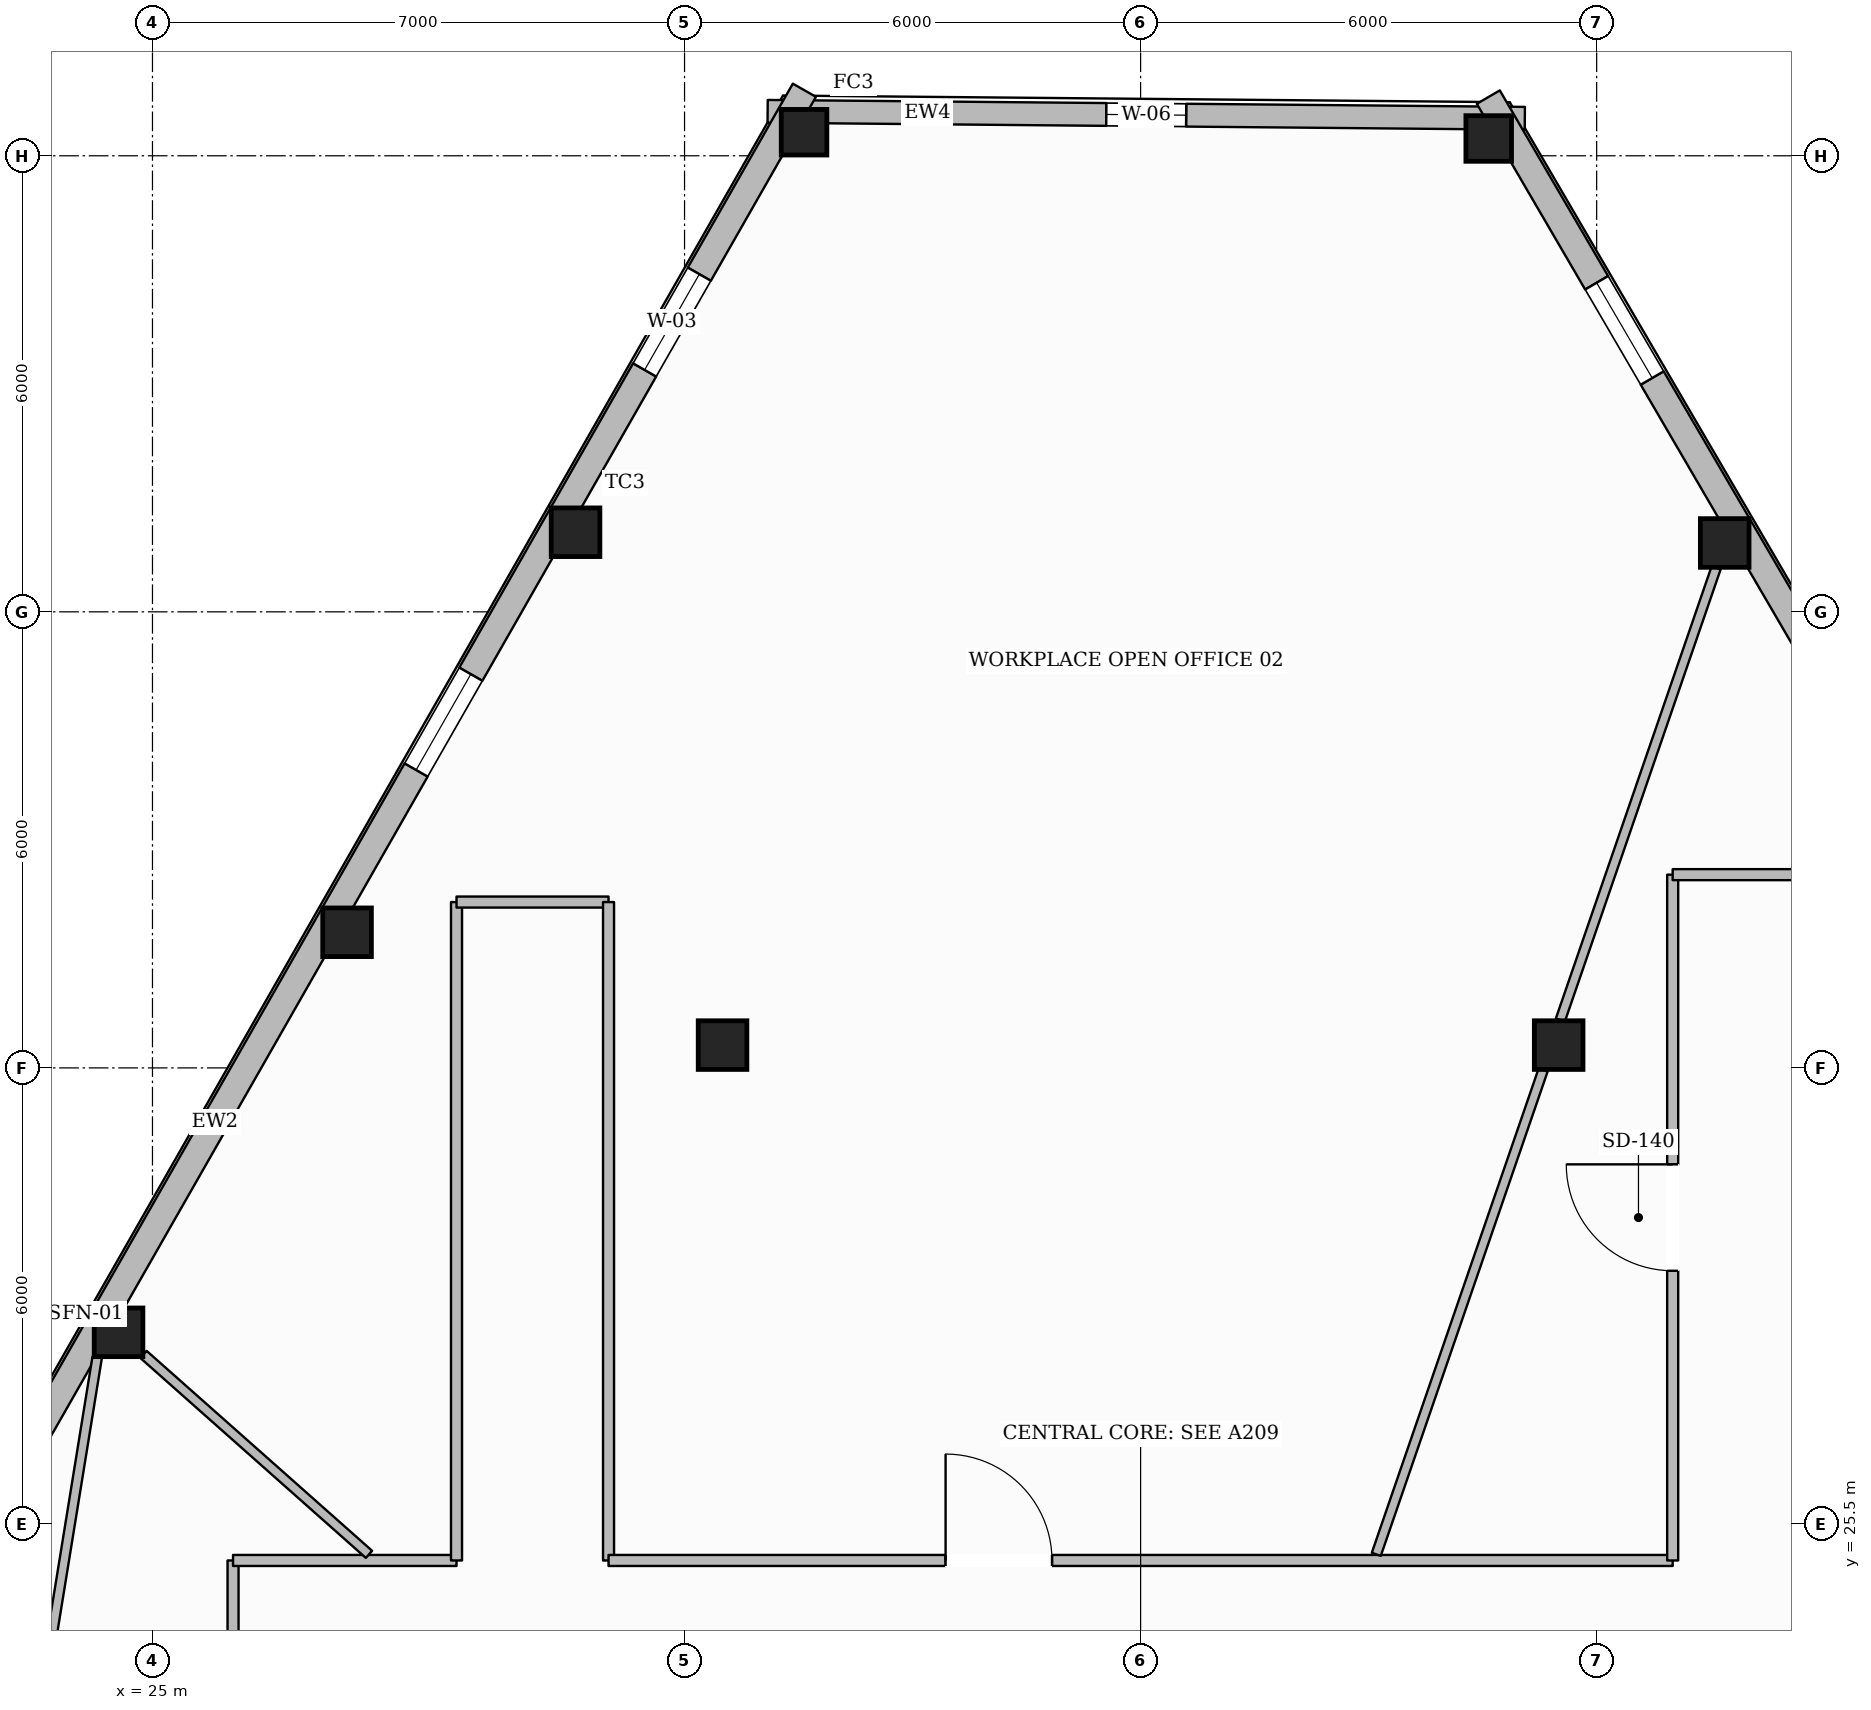
"""IFC4 building model, lengths in metres.
Left out: names, types, materials, properties, quantities, classifications, styles, units other than length and angle.
Written with IfcOpenShell. Run it as: python <this file> out.ifc"""

import sys

from ifc_helpers import new_model, si_unit, direction, frame, frame_2d, origin, origin_2d, place, context, subcontext, project, spatial, rectangle, hollow_rectangle, extrude, element, fill, save


model = new_model("IFC4")
c1 = context("Model", 3, precision=1e-05, world=origin(), true_north=direction((0.0, 1.0)))
c2 = subcontext(c1, "Body", "Model", "MODEL_VIEW")
j1 = project(units=[si_unit("LENGTHUNIT", "METRE"), si_unit("PLANEANGLEUNIT", "RADIAN")], contexts=[c1])
p1 = place(None, origin())
s1 = spatial("IfcSite", under=j1, at=p1, CompositionType="ELEMENT")
p2 = place(p1, origin())
s2 = spatial("IfcBuilding", under=s1, at=p2, CompositionType="ELEMENT")
p3 = place(p2, frame((0.0, 0.0, 184.25)))
s3 = spatial("IfcBuildingStorey", under=s2, at=p3, CompositionType="ELEMENT", Elevation=184.25)
p4 = place(p3, frame((33.572, 43.81, 0.0), z_axis=(0.0, 0.0, 1.0), x_axis=(1.0, 0.0, 0.0)))
e1 = element("IfcColumn", 1, at=p4, inside=s3, PredefinedType="COLUMN", context=c2, shape_type="SweptSolid", body=[
    extrude(hollow_rectangle(XDim=0.6, YDim=0.6, WallThickness=0.028, at=origin_2d()), origin(), (0.0, 0.0, 1.0), 3.6),
])
for number, where, z_axis, x_axis in (
    (2, (30.566, 38.547, 0.0), (0.0, 0.0, 1.0), (1.0, 0.0, 0.0)),
    (3, (27.56, 33.284, 0.0), (0.0, 0.0, 1.0), (1.0, 0.0, 0.0)),
    (4, (24.554, 28.021, 0.0), (0.0, 0.0, 1.0), (1.0, 0.0, 0.0)),
    (5, (45.684, 38.406, 0.0), (0.0, 0.0, 1.0), (1.0, 0.0, 0.0)),
):
    element("IfcColumn", number, at=place(p3, frame(where, z_axis=z_axis, x_axis=x_axis)), inside=s3, PredefinedType="COLUMN", context=c2, shape_type="SweptSolid", body=[
        extrude(hollow_rectangle(XDim=0.64, YDim=0.64, WallThickness=0.028, at=origin_2d()), origin(), (0.0, 0.0, 1.0), 3.6),
    ])
p5 = place(p3, frame((42.58, 43.727, 0.0), z_axis=(0.0, 0.0, 1.0), x_axis=(1.0, 0.0, 0.0)))
e6 = element("IfcColumn", 6, at=p5, inside=s3, PredefinedType="COLUMN", context=c2, shape_type="SweptSolid", body=[
    extrude(hollow_rectangle(XDim=0.6, YDim=0.6, WallThickness=0.028, at=origin_2d()), origin(), (0.0, 0.0, 1.0), 3.6),
])
for number, where, z_axis, x_axis in (
    (7, (32.5, 31.8, 0.0), (0.0, 0.0, 1.0), (1.0, 0.0, 0.0)),
    (8, (43.5, 31.8, 0.0), (0.0, 0.0, 1.0), (1.0, 0.0, 0.0)),
):
    element("IfcColumn", number, at=place(p3, frame(where, z_axis=z_axis, x_axis=x_axis)), inside=s3, PredefinedType="COLUMN", context=c2, shape_type="SweptSolid", body=[
        extrude(hollow_rectangle(XDim=0.64, YDim=0.64, WallThickness=0.028, at=origin_2d()), origin(), (0.0, 0.0, 1.0), 3.6),
    ])
p6 = place(p3, frame((33.093, 44.084, 0.0), z_axis=(0.0, 0.0, 1.0), x_axis=(0.999957994936, -0.009165607679, 0.0)))
e9 = element("IfcWall", 9, at=p6, inside=s3, PredefinedType="STANDARD", context=c2, shape_type="SweptSolid", body=[
    extrude(rectangle(XDim=9.962, YDim=0.3, at=frame_2d((4.981, 0.0))), origin(), (0.0, 0.0, 1.0), 3.132),
])
p7 = place(p6, frame((4.456, 0.0, 0.65)))
e10 = element("IfcOpeningElement", 10, at=p7, cuts=e9, PredefinedType="OPENING", context=c2, shape_type="SweptSolid", body=[
    extrude(rectangle(XDim=1.05, YDim=1.7, at=frame_2d((0.525, 0.85))), frame((0.0, 0.16, 0.0), z_axis=(0.0, -1.0, 0.0), x_axis=(1.0, 0.0, 0.0)), (0.0, 0.0, 1.0), 0.32),
])
p8 = place(p3, frame((15.064, 11.953, 0.0), z_axis=(0.0, 0.0, 1.0), x_axis=(0.495993114815, 0.86832645362, 0.0)))
e11 = element("IfcWall", 11, at=p8, inside=s3, PredefinedType="STANDARD", context=c2, shape_type="SweptSolid", body=[
    extrude(rectangle(XDim=37.324, YDim=0.35, at=frame_2d((18.662, 0.0))), origin(), (0.0, 0.0, 1.0), 3.132),
])
p9 = place(p8, frame((33.087, 0.0, 0.65)))
e12 = element("IfcOpeningElement", 12, at=p9, cuts=e11, PredefinedType="OPENING", context=c2, shape_type="SweptSolid", body=[
    extrude(rectangle(XDim=1.45, YDim=1.75, at=frame_2d((0.725, 0.875))), frame((0.0, 0.185, 0.0), z_axis=(0.0, -1.0, 0.0), x_axis=(1.0, 0.0, 0.0)), (0.0, 0.0, 1.0), 0.37),
])
p10 = place(p8, frame((27.026, 0.0, 0.65)))
e13 = element("IfcOpeningElement", 13, at=p10, cuts=e11, PredefinedType="OPENING", context=c2, shape_type="SweptSolid", body=[
    extrude(rectangle(XDim=1.45, YDim=1.75, at=frame_2d((0.725, 0.875))), frame((0.0, 0.185, 0.0), z_axis=(0.0, -1.0, 0.0), x_axis=(1.0, 0.0, 0.0)), (0.0, 0.0, 1.0), 0.37),
])
p11 = place(p8, frame((14.904, 0.0, 0.65)))
e14 = element("IfcOpeningElement", 14, at=p11, cuts=e11, PredefinedType="OPENING", context=c2, shape_type="SweptSolid", body=[
    extrude(rectangle(XDim=1.45, YDim=1.75, at=frame_2d((0.725, 0.875))), frame((0.0, 0.185, 0.0), z_axis=(0.0, -1.0, 0.0), x_axis=(1.0, 0.0, 0.0)), (0.0, 0.0, 1.0), 0.37),
])
p12 = place(p8, frame((8.844, 0.0, 0.65)))
e15 = element("IfcOpeningElement", 15, at=p12, cuts=e11, PredefinedType="OPENING", context=c2, shape_type="SweptSolid", body=[
    extrude(rectangle(XDim=1.45, YDim=1.75, at=frame_2d((0.725, 0.875))), frame((0.0, 0.185, 0.0), z_axis=(0.0, -1.0, 0.0), x_axis=(1.0, 0.0, 0.0)), (0.0, 0.0, 1.0), 0.37),
])
p13 = place(p8, frame((2.782, 0.0, 0.65)))
e16 = element("IfcOpeningElement", 16, at=p13, cuts=e11, PredefinedType="OPENING", context=c2, shape_type="SweptSolid", body=[
    extrude(rectangle(XDim=1.45, YDim=1.75, at=frame_2d((0.725, 0.875))), frame((0.0, 0.185, 0.0), z_axis=(0.0, -1.0, 0.0), x_axis=(1.0, 0.0, 0.0)), (0.0, 0.0, 1.0), 0.37),
])
p14 = place(p3, frame((42.575, 44.272, 0.0), z_axis=(0.0, 0.0, 1.0), x_axis=(0.503934681705, -0.863741764982, 0.0)))
e17 = element("IfcWall", 17, at=p14, inside=s3, PredefinedType="STANDARD", context=c2, shape_type="SweptSolid", body=[
    extrude(rectangle(XDim=37.915, YDim=0.35, at=frame_2d((18.958, 0.0))), origin(), (0.0, 0.0, 1.0), 3.132),
])
p15 = place(p14, frame((33.633, 0.0, 0.65)))
e18 = element("IfcOpeningElement", 18, at=p15, cuts=e17, PredefinedType="OPENING", context=c2, shape_type="SweptSolid", body=[
    extrude(rectangle(XDim=1.45, YDim=1.75, at=frame_2d((0.725, 0.875))), frame((0.0, 0.185, 0.0), z_axis=(0.0, -1.0, 0.0), x_axis=(1.0, 0.0, 0.0)), (0.0, 0.0, 1.0), 0.37),
])
p16 = place(p14, frame((27.472, 0.0, 0.65)))
e19 = element("IfcOpeningElement", 19, at=p16, cuts=e17, PredefinedType="OPENING", context=c2, shape_type="SweptSolid", body=[
    extrude(rectangle(XDim=1.45, YDim=1.75, at=frame_2d((0.725, 0.875))), frame((0.0, 0.185, 0.0), z_axis=(0.0, -1.0, 0.0), x_axis=(1.0, 0.0, 0.0)), (0.0, 0.0, 1.0), 0.37),
])
p17 = place(p14, frame((15.15, 0.0, 0.65)))
e20 = element("IfcOpeningElement", 20, at=p17, cuts=e17, PredefinedType="OPENING", context=c2, shape_type="SweptSolid", body=[
    extrude(rectangle(XDim=1.45, YDim=1.75, at=frame_2d((0.725, 0.875))), frame((0.0, 0.185, 0.0), z_axis=(0.0, -1.0, 0.0), x_axis=(1.0, 0.0, 0.0)), (0.0, 0.0, 1.0), 0.37),
])
p18 = place(p14, frame((8.989, 0.0, 0.65)))
e21 = element("IfcOpeningElement", 21, at=p18, cuts=e17, PredefinedType="OPENING", context=c2, shape_type="SweptSolid", body=[
    extrude(rectangle(XDim=1.45, YDim=1.75, at=frame_2d((0.725, 0.875))), frame((0.0, 0.185, 0.0), z_axis=(0.0, -1.0, 0.0), x_axis=(1.0, 0.0, 0.0)), (0.0, 0.0, 1.0), 0.37),
])
p19 = place(p14, frame((2.828, 0.0, 0.65)))
e22 = element("IfcOpeningElement", 22, at=p19, cuts=e17, PredefinedType="OPENING", context=c2, shape_type="SweptSolid", body=[
    extrude(rectangle(XDim=1.45, YDim=1.75, at=frame_2d((0.725, 0.875))), frame((0.0, 0.185, 0.0), z_axis=(0.0, -1.0, 0.0), x_axis=(1.0, 0.0, 0.0)), (0.0, 0.0, 1.0), 0.37),
])
p20 = place(p3, frame((26.06, 17.65, 0.0), z_axis=(0.0, 0.0, 1.0), x_axis=(0.0, 1.0, 0.0)))
e23 = element("IfcWall", 23, at=p20, inside=s3, PredefinedType="PARTITIONING", context=c2, shape_type="SweptSolid", body=[
    extrude(rectangle(XDim=7.37, YDim=0.145, at=frame_2d((3.685, 0.0))), origin(), (0.0, 0.0, 1.0), 3.339),
])
p21 = place(p20, frame((3.195, 0.0, 0.0)))
e24 = element("IfcOpeningElement", 24, at=p21, cuts=e23, PredefinedType="OPENING", context=c2, shape_type="SweptSolid", body=[
    extrude(rectangle(XDim=0.98, YDim=2.15, at=frame_2d((0.49, 1.075))), frame((0.0, 0.083, 0.0), z_axis=(0.0, -1.0, 0.0), x_axis=(1.0, 0.0, 0.0)), (0.0, 0.0, 1.0), 0.165),
])
p22 = place(p3, frame((26.06, 25.02, 0.0), z_axis=(0.0, 0.0, 1.0), x_axis=(1.0, 0.0, 0.0)))
e25 = element("IfcWall", 25, at=p22, inside=s3, PredefinedType="PARTITIONING", context=c2, shape_type="SweptSolid", body=[
    extrude(rectangle(XDim=2.94, YDim=0.145, at=frame_2d((1.47, 0.0))), origin(), (0.0, 0.0, 1.0), 3.6),
])
p23 = place(p3, frame((29.0, 25.02, 0.0), z_axis=(0.0, 0.0, 1.0), x_axis=(0.0, 1.0, 0.0)))
e26 = element("IfcWall", 26, at=p23, inside=s3, PredefinedType="PARTITIONING", context=c2, shape_type="SweptSolid", body=[
    extrude(rectangle(XDim=8.662, YDim=0.145, at=frame_2d((4.331, 0.0))), origin(), (0.0, 0.0, 1.0), 3.6),
])
p24 = place(p3, frame((29.0, 33.682, 0.0), z_axis=(0.0, 0.0, 1.0), x_axis=(1.0, 0.0, 0.0)))
e27 = element("IfcWall", 27, at=p24, inside=s3, PredefinedType="PARTITIONING", context=c2, shape_type="SweptSolid", body=[
    extrude(rectangle(XDim=2.0, YDim=0.145, at=frame_2d((1.0, 0.0))), origin(), (0.0, 0.0, 1.0), 3.6),
])
p25 = place(p3, frame((31.0, 33.682, 0.0), z_axis=(0.0, 0.0, 1.0), x_axis=(0.0, -1.0, 0.0)))
e28 = element("IfcWall", 28, at=p25, inside=s3, PredefinedType="PARTITIONING", context=c2, shape_type="SweptSolid", body=[
    extrude(rectangle(XDim=8.662, YDim=0.145, at=frame_2d((4.331, 0.0))), origin(), (0.0, 0.0, 1.0), 3.6),
])
p26 = place(p3, frame((31.0, 25.02, 0.0), z_axis=(0.0, 0.0, 1.0), x_axis=(1.0, 0.0, 0.0)))
e29 = element("IfcWall", 29, at=p26, inside=s3, PredefinedType="PARTITIONING", context=c2, shape_type="SweptSolid", body=[
    extrude(rectangle(XDim=14.0, YDim=0.145, at=frame_2d((7.0, 0.0))), origin(), (0.0, 0.0, 1.0), 3.6),
])
p27 = place(p26, frame((4.434, 0.0, 0.0)))
e30 = element("IfcOpeningElement", 30, at=p27, cuts=e29, PredefinedType="OPENING", context=c2, shape_type="SweptSolid", body=[
    extrude(rectangle(XDim=1.4, YDim=2.2, at=frame_2d((0.7, 1.1))), frame((0.0, 0.083, 0.0), z_axis=(0.0, -1.0, 0.0), x_axis=(1.0, 0.0, 0.0)), (0.0, 0.0, 1.0), 0.165),
])
p28 = place(p3, frame((45.0, 25.02, 0.0), z_axis=(0.0, 0.0, 1.0), x_axis=(0.0, 1.0, 0.0)))
e31 = element("IfcWall", 31, at=p28, inside=s3, PredefinedType="PARTITIONING", context=c2, shape_type="SweptSolid", body=[
    extrude(rectangle(XDim=9.022, YDim=0.145, at=frame_2d((4.511, 0.0))), origin(), (0.0, 0.0, 1.0), 3.6),
])
p29 = place(p28, frame((3.811, 0.0, 0.0)))
e32 = element("IfcOpeningElement", 32, at=p29, cuts=e31, PredefinedType="OPENING", context=c2, shape_type="SweptSolid", body=[
    extrude(rectangle(XDim=1.4, YDim=2.2, at=frame_2d((0.7, 1.1))), frame((0.0, 0.083, 0.0), z_axis=(0.0, -1.0, 0.0), x_axis=(1.0, 0.0, 0.0)), (0.0, 0.0, 1.0), 0.165),
])
p30 = place(p3, frame((45.0, 34.042, 0.0), z_axis=(0.0, 0.0, 1.0), x_axis=(1.0, 0.0, 0.0)))
e33 = element("IfcWall", 33, at=p30, inside=s3, PredefinedType="PARTITIONING", context=c2, shape_type="SweptSolid", body=[
    extrude(rectangle(XDim=2.0, YDim=0.145, at=frame_2d((1.0, 0.0))), origin(), (0.0, 0.0, 1.0), 3.6),
])
p31 = place(p3, frame((41.101, 25.101, 0.0), z_axis=(0.0, 0.0, 1.0), x_axis=(0.325732757855, 0.945461882077, 0.0)))
e34 = element("IfcWall", 34, at=p31, inside=s3, PredefinedType="PARTITIONING", context=c2, shape_type="SweptSolid", body=[
    extrude(rectangle(XDim=6.739, YDim=0.125, at=frame_2d((3.369, 0.0))), origin(), (0.0, 0.0, 1.0), 3.141),
])
p32 = place(p3, frame((43.521, 32.128, 0.0), z_axis=(0.0, 0.0, 1.0), x_axis=(0.325720467461, 0.945466116303, 0.0)))
e35 = element("IfcWall", 35, at=p32, inside=s3, PredefinedType="PARTITIONING", context=c2, shape_type="SweptSolid", body=[
    extrude(rectangle(XDim=6.293, YDim=0.125, at=frame_2d((3.146, 0.0))), origin(), (0.0, 0.0, 1.0), 3.6),
])
p33 = place(p3, frame((27.848, 25.101, 0.0), z_axis=(0.0, 0.0, 1.0), x_axis=(-0.748288582972, 0.66337334631, 0.0)))
e36 = element("IfcWall", 36, at=p33, inside=s3, PredefinedType="PARTITIONING", context=c2, shape_type="SweptSolid", body=[
    extrude(rectangle(XDim=3.965, YDim=0.125, at=frame_2d((1.982, 0.0))), origin(), (0.0, 0.0, 1.0), 3.141),
])
p34 = place(p3, frame((24.273, 27.694, 0.0), z_axis=(0.0, 0.0, 1.0), x_axis=(-0.160245052552, -0.987077263, 0.0)))
e37 = element("IfcWall", 37, at=p34, inside=s3, PredefinedType="PARTITIONING", context=c2, shape_type="SweptSolid", body=[
    extrude(rectangle(XDim=14.53, YDim=0.125, at=frame_2d((7.265, 0.0))), origin(), (0.0, 0.0, 1.0), 3.135),
])
p35 = place(p34, frame((6.665, 0.0, 0.0)))
e38 = element("IfcOpeningElement", 38, at=p35, cuts=e37, PredefinedType="OPENING", context=c2, shape_type="SweptSolid", body=[
    extrude(rectangle(XDim=0.98, YDim=2.15, at=frame_2d((0.49, 1.075))), frame((0.0, 0.073, 0.0), z_axis=(0.0, -1.0, 0.0), x_axis=(1.0, 0.0, 0.0)), (0.0, 0.0, 1.0), 0.145),
])
p36 = place(p9, origin())
e39 = element("IfcWindow", 39, at=p36, inside=s3, PartitioningType="SINGLE_PANEL", PredefinedType="WINDOW", context=c2, shape_type="SweptSolid", body=[
    extrude(rectangle(XDim=1.45, YDim=1.75, at=frame_2d((0.725, 0.875))), frame((0.0, 0.03, 0.0), z_axis=(0.0, -1.0, 0.0), x_axis=(1.0, 0.0, 0.0)), (0.0, 0.0, 1.0), 0.06),
])
fill(e12, e39)
p37 = place(p10, origin())
e40 = element("IfcWindow", 40, at=p37, inside=s3, PartitioningType="SINGLE_PANEL", PredefinedType="WINDOW", context=c2, shape_type="SweptSolid", body=[
    extrude(rectangle(XDim=1.45, YDim=1.75, at=frame_2d((0.725, 0.875))), frame((0.0, 0.03, 0.0), z_axis=(0.0, -1.0, 0.0), x_axis=(1.0, 0.0, 0.0)), (0.0, 0.0, 1.0), 0.06),
])
fill(e13, e40)
p38 = place(p19, origin())
e41 = element("IfcWindow", 41, at=p38, inside=s3, PartitioningType="SINGLE_PANEL", PredefinedType="WINDOW", context=c2, shape_type="SweptSolid", body=[
    extrude(rectangle(XDim=1.45, YDim=1.75, at=frame_2d((0.725, 0.875))), frame((0.0, 0.03, 0.0), z_axis=(0.0, -1.0, 0.0), x_axis=(1.0, 0.0, 0.0)), (0.0, 0.0, 1.0), 0.06),
])
fill(e22, e41)
p39 = place(p7, origin())
e42 = element("IfcWindow", 42, at=p39, inside=s3, PartitioningType="SINGLE_PANEL", PredefinedType="WINDOW", context=c2, shape_type="SweptSolid", body=[
    extrude(rectangle(XDim=1.05, YDim=1.7, at=frame_2d((0.525, 0.85))), frame((0.0, 0.03, 0.0), z_axis=(0.0, -1.0, 0.0), x_axis=(1.0, 0.0, 0.0)), (0.0, 0.0, 1.0), 0.06),
])
fill(e10, e42)
p40 = place(p29, origin())
e43 = element("IfcDoor", 43, at=p40, inside=s3, OperationType="SINGLE_SWING_RIGHT", PredefinedType="DOOR", context=c2, shape_type="SweptSolid", body=[
    extrude(rectangle(XDim=1.4, YDim=2.2, at=frame_2d((0.7, 1.1))), frame((0.0, 0.025, 0.0), z_axis=(0.0, -1.0, 0.0), x_axis=(1.0, 0.0, 0.0)), (0.0, 0.0, 1.0), 0.05),
])
fill(e32, e43)
p41 = place(p27, origin())
e44 = element("IfcDoor", 44, at=p41, inside=s3, OperationType="SINGLE_SWING_LEFT", PredefinedType="DOOR", context=c2, shape_type="SweptSolid", body=[
    extrude(rectangle(XDim=1.4, YDim=2.2, at=frame_2d((0.7, 1.1))), frame((0.0, 0.025, 0.0), z_axis=(0.0, -1.0, 0.0), x_axis=(1.0, 0.0, 0.0)), (0.0, 0.0, 1.0), 0.05),
])
fill(e30, e44)
save(model, sys.argv[1])
